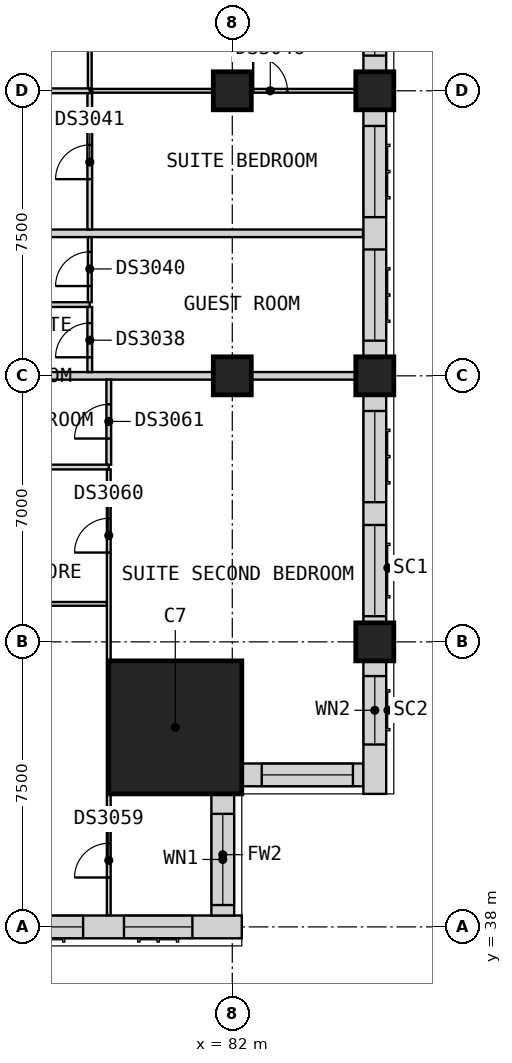
"""IFC4 building model, lengths in metres.
Left out: names, types, materials, properties, quantities, classifications, styles, units other than length and angle.
Written with IfcOpenShell. Run it as: python <this file> out.ifc"""

import sys

from ifc_helpers import new_model, si_unit, direction, frame, frame_2d, origin, origin_2d, place, context, subcontext, project, spatial, rectangle, extrude, element, fill, save


model = new_model("IFC4")
c1 = context("Model", 3, precision=1e-05, world=origin(), true_north=direction((0.0, 1.0)))
c2 = subcontext(c1, "Body", "Model", "MODEL_VIEW")
j1 = project(units=[si_unit("LENGTHUNIT", "METRE"), si_unit("PLANEANGLEUNIT", "RADIAN")], contexts=[c1])
p1 = place(None, origin())
s1 = spatial("IfcSite", under=j1, at=p1, CompositionType="ELEMENT")
p2 = place(p1, origin())
s2 = spatial("IfcBuilding", under=s1, at=p2, CompositionType="ELEMENT")
p3 = place(p2, frame((0.0, 0.0, 137.4)))
s3 = spatial("IfcBuildingStorey", under=s2, at=p3, CompositionType="ELEMENT", Elevation=137.4)
for number, where, z_axis, x_axis in (
    (1, (85.75, 45.5, 0.0), (0.0, 0.0, 1.0), (1.0, 0.0, 0.0)),
    (2, (85.75, 52.5, 0.0), (0.0, 0.0, 1.0), (1.0, 0.0, 0.0)),
    (3, (85.75, 60.0, 0.0), (0.0, 0.0, 1.0), (1.0, 0.0, 0.0)),
    (4, (82.0, 52.5, 0.0), (0.0, 0.0, 1.0), (1.0, 0.0, 0.0)),
    (5, (82.0, 60.0, 0.0), (0.0, 0.0, 1.0), (1.0, 0.0, 0.0)),
):
    element("IfcColumn", number, at=place(p3, frame(where, z_axis=z_axis, x_axis=x_axis)), inside=s3, PredefinedType="COLUMN", context=c2, shape_type="SweptSolid", body=[
        extrude(rectangle(XDim=1.0, YDim=1.0, at=origin_2d()), origin(), (0.0, 0.0, 1.0), 3.6),
    ])
p4 = place(p3, frame((80.5, 43.25, 0.0), z_axis=(0.0, 0.0, 1.0), x_axis=(1.0, 0.0, 0.0)))
e6 = element("IfcColumn", 6, at=p4, inside=s3, PredefinedType="COLUMN", context=c2, shape_type="SweptSolid", body=[
    extrude(rectangle(XDim=3.5, YDim=3.5, at=origin_2d()), origin(), (0.0, 0.0, 1.0), 3.6),
])
p5 = place(p3, frame((75.0, 38.0, 0.0), z_axis=(0.0, 0.0, 1.0), x_axis=(1.0, 0.0, 0.0)))
e7 = element("IfcWall", 7, at=p5, inside=s3, PredefinedType="SOLIDWALL", context=c2, shape_type="SweptSolid", body=[
    extrude(rectangle(XDim=7.25, YDim=0.6, at=frame_2d((3.625, 0.0))), origin(), (0.0, 0.0, 1.0), 2.85),
])
p6 = place(p5, frame((0.675, 0.0, 0.8)))
e8 = element("IfcOpeningElement", 8, at=p6, cuts=e7, PredefinedType="OPENING", context=c2, shape_type="SweptSolid", body=[
    extrude(rectangle(XDim=2.4, YDim=1.8, at=frame_2d((1.2, 0.9))), frame((0.0, 0.31, 0.0), z_axis=(0.0, -1.0, 0.0), x_axis=(1.0, 0.0, 0.0)), (0.0, 0.0, 1.0), 0.62),
])
p7 = place(p5, frame((4.15, 0.0, 0.8)))
e9 = element("IfcOpeningElement", 9, at=p7, cuts=e7, PredefinedType="OPENING", context=c2, shape_type="SweptSolid", body=[
    extrude(rectangle(XDim=1.8, YDim=1.8, at=frame_2d((0.9, 0.9))), frame((0.0, 0.31, 0.0), z_axis=(0.0, -1.0, 0.0), x_axis=(1.0, 0.0, 0.0)), (0.0, 0.0, 1.0), 0.62),
])
p8 = place(p3, frame((81.75, 38.3, 0.0), z_axis=(0.0, 0.0, 1.0), x_axis=(0.0, 1.0, 0.0)))
e10 = element("IfcWall", 10, at=p8, inside=s3, PredefinedType="SOLIDWALL", context=c2, shape_type="SweptSolid", body=[
    extrude(rectangle(XDim=3.2, YDim=0.6, at=frame_2d((1.6, 0.0))), origin(), (0.0, 0.0, 1.0), 3.35),
])
p9 = place(p8, frame((0.275, 0.0, 0.8)))
e11 = element("IfcOpeningElement", 11, at=p9, cuts=e10, PredefinedType="OPENING", context=c2, shape_type="SweptSolid", body=[
    extrude(rectangle(XDim=2.4, YDim=1.8, at=frame_2d((1.2, 0.9))), frame((0.0, 0.31, 0.0), z_axis=(0.0, -1.0, 0.0), x_axis=(1.0, 0.0, 0.0)), (0.0, 0.0, 1.0), 0.62),
])
p10 = place(p3, frame((82.25, 42.0, 0.0), z_axis=(0.0, 0.0, 1.0), x_axis=(1.0, 0.0, 0.0)))
e12 = element("IfcWall", 12, at=p10, inside=s3, PredefinedType="SOLIDWALL", context=c2, shape_type="SweptSolid", body=[
    extrude(rectangle(XDim=3.2, YDim=0.6, at=frame_2d((1.6, 0.0))), origin(), (0.0, 0.0, 1.0), 3.35),
])
p11 = place(p10, frame((0.525, 0.0, 0.8)))
e13 = element("IfcOpeningElement", 13, at=p11, cuts=e12, PredefinedType="OPENING", context=c2, shape_type="SweptSolid", body=[
    extrude(rectangle(XDim=2.4, YDim=1.8, at=frame_2d((1.2, 0.9))), frame((0.0, 0.31, 0.0), z_axis=(0.0, -1.0, 0.0), x_axis=(1.0, 0.0, 0.0)), (0.0, 0.0, 1.0), 0.62),
])
p12 = place(p3, frame((85.75, 41.5, 0.0), z_axis=(0.0, 0.0, 1.0), x_axis=(0.0, 1.0, 0.0)))
e14 = element("IfcWall", 14, at=p12, inside=s3, PredefinedType="SOLIDWALL", context=c2, shape_type="SweptSolid", body=[
    extrude(rectangle(XDim=3.5, YDim=0.6, at=frame_2d((1.75, 0.0))), origin(), (0.0, 0.0, 1.0), 3.35),
])
p13 = place(p12, frame((1.3, 0.0, 0.8)))
e15 = element("IfcOpeningElement", 15, at=p13, cuts=e14, PredefinedType="OPENING", context=c2, shape_type="SweptSolid", body=[
    extrude(rectangle(XDim=1.8, YDim=1.8, at=frame_2d((0.9, 0.9))), frame((0.0, 0.31, 0.0), z_axis=(0.0, -1.0, 0.0), x_axis=(1.0, 0.0, 0.0)), (0.0, 0.0, 1.0), 0.62),
])
p14 = place(p3, frame((85.75, 46.0, 0.0), z_axis=(0.0, 0.0, 1.0), x_axis=(0.0, 1.0, 0.0)))
e16 = element("IfcWall", 16, at=p14, inside=s3, PredefinedType="SOLIDWALL", context=c2, shape_type="SweptSolid", body=[
    extrude(rectangle(XDim=6.0, YDim=0.6, at=frame_2d((3.0, 0.0))), origin(), (0.0, 0.0, 1.0), 2.85),
])
p15 = place(p14, frame((0.175, 0.0, 0.8)))
e17 = element("IfcOpeningElement", 17, at=p15, cuts=e16, PredefinedType="OPENING", context=c2, shape_type="SweptSolid", body=[
    extrude(rectangle(XDim=2.4, YDim=1.8, at=frame_2d((1.2, 0.9))), frame((0.0, 0.31, 0.0), z_axis=(0.0, -1.0, 0.0), x_axis=(1.0, 0.0, 0.0)), (0.0, 0.0, 1.0), 0.62),
])
p16 = place(p14, frame((3.175, 0.0, 0.8)))
e18 = element("IfcOpeningElement", 18, at=p16, cuts=e16, PredefinedType="OPENING", context=c2, shape_type="SweptSolid", body=[
    extrude(rectangle(XDim=2.4, YDim=1.8, at=frame_2d((1.2, 0.9))), frame((0.0, 0.31, 0.0), z_axis=(0.0, -1.0, 0.0), x_axis=(1.0, 0.0, 0.0)), (0.0, 0.0, 1.0), 0.62),
])
p17 = place(p3, frame((85.75, 53.0, 0.0), z_axis=(0.0, 0.0, 1.0), x_axis=(0.0, 1.0, 0.0)))
e19 = element("IfcWall", 19, at=p17, inside=s3, PredefinedType="SOLIDWALL", context=c2, shape_type="SweptSolid", body=[
    extrude(rectangle(XDim=6.5, YDim=0.6, at=frame_2d((3.25, 0.0))), origin(), (0.0, 0.0, 1.0), 2.85),
])
p18 = place(p17, frame((0.425, 0.0, 0.8)))
e20 = element("IfcOpeningElement", 20, at=p18, cuts=e19, PredefinedType="OPENING", context=c2, shape_type="SweptSolid", body=[
    extrude(rectangle(XDim=2.4, YDim=1.8, at=frame_2d((1.2, 0.9))), frame((0.0, 0.31, 0.0), z_axis=(0.0, -1.0, 0.0), x_axis=(1.0, 0.0, 0.0)), (0.0, 0.0, 1.0), 0.62),
])
p19 = place(p17, frame((3.675, 0.0, 0.8)))
e21 = element("IfcOpeningElement", 21, at=p19, cuts=e19, PredefinedType="OPENING", context=c2, shape_type="SweptSolid", body=[
    extrude(rectangle(XDim=2.4, YDim=1.8, at=frame_2d((1.2, 0.9))), frame((0.0, 0.31, 0.0), z_axis=(0.0, -1.0, 0.0), x_axis=(1.0, 0.0, 0.0)), (0.0, 0.0, 1.0), 0.62),
])
p20 = place(p3, frame((85.75, 60.5, 0.0), z_axis=(0.0, 0.0, 1.0), x_axis=(0.0, 1.0, 0.0)))
e22 = element("IfcWall", 22, at=p20, inside=s3, PredefinedType="SOLIDWALL", context=c2, shape_type="SweptSolid", body=[
    extrude(rectangle(XDim=6.5, YDim=0.6, at=frame_2d((3.25, 0.0))), origin(), (0.0, 0.0, 1.0), 2.85),
])
p21 = place(p20, frame((0.425, 0.0, 0.8)))
e23 = element("IfcOpeningElement", 23, at=p21, cuts=e22, PredefinedType="OPENING", context=c2, shape_type="SweptSolid", body=[
    extrude(rectangle(XDim=2.4, YDim=1.8, at=frame_2d((1.2, 0.9))), frame((0.0, 0.31, 0.0), z_axis=(0.0, -1.0, 0.0), x_axis=(1.0, 0.0, 0.0)), (0.0, 0.0, 1.0), 0.62),
])
p22 = place(p20, frame((3.675, 0.0, 0.8)))
e24 = element("IfcOpeningElement", 24, at=p22, cuts=e22, PredefinedType="OPENING", context=c2, shape_type="SweptSolid", body=[
    extrude(rectangle(XDim=2.4, YDim=1.8, at=frame_2d((1.2, 0.9))), frame((0.0, 0.31, 0.0), z_axis=(0.0, -1.0, 0.0), x_axis=(1.0, 0.0, 0.0)), (0.0, 0.0, 1.0), 0.62),
])
p23 = place(p3, frame((73.725, 52.5, 0.0), z_axis=(0.0, 0.0, 1.0), x_axis=(1.0, 0.0, 0.0)))
e25 = element("IfcWall", 25, at=p23, inside=s3, PredefinedType="PARTITIONING", context=c2, shape_type="SweptSolid", body=[
    extrude(rectangle(XDim=12.525, YDim=0.2, at=frame_2d((6.262, 0.0))), origin(), (0.0, 0.0, 1.0), 3.35),
])
p24 = place(p3, frame((73.725, 56.25, 0.0), z_axis=(0.0, 0.0, 1.0), x_axis=(1.0, 0.0, 0.0)))
e26 = element("IfcWall", 26, at=p24, inside=s3, PredefinedType="PARTITIONING", context=c2, shape_type="SweptSolid", body=[
    extrude(rectangle(XDim=11.715, YDim=0.2, at=frame_2d((5.857, 0.0))), origin(), (0.0, 0.0, 1.0), 3.35),
])
p25 = place(p3, frame((78.8, 42.0, 0.0), z_axis=(0.0, 0.0, 1.0), x_axis=(1.0, 0.0, 0.0)))
e27 = element("IfcWall", 27, at=p25, inside=s3, PredefinedType="PARTITIONING", context=c2, shape_type="SweptSolid", body=[
    extrude(rectangle(XDim=3.44, YDim=0.1, at=frame_2d((1.72, 0.0))), origin(), (0.0, 0.0, 1.0), 3.35),
])
p26 = place(p3, frame((71.35, 46.5, 0.0), z_axis=(0.0, 0.0, 1.0), x_axis=(1.0, 0.0, 0.0)))
e28 = element("IfcWall", 28, at=p26, inside=s3, PredefinedType="PARTITIONING", context=c2, shape_type="SweptSolid", body=[
    extrude(rectangle(XDim=7.35, YDim=0.1, at=frame_2d((3.675, 0.0))), origin(), (0.0, 0.0, 1.0), 3.35),
])
p27 = place(p26, frame((0.65, 0.0, 0.0)))
e29 = element("IfcOpeningElement", 29, at=p27, cuts=e28, PredefinedType="OPENING", context=c2, shape_type="SweptSolid", body=[
    extrude(rectangle(XDim=0.9, YDim=2.1, at=frame_2d((0.45, 1.05))), frame((0.0, 0.06, 0.0), z_axis=(0.0, -1.0, 0.0), x_axis=(1.0, 0.0, 0.0)), (0.0, 0.0, 1.0), 0.12),
])
p28 = place(p3, frame((78.312, 60.0, 0.0), z_axis=(0.0, 0.0, 1.0), x_axis=(1.0, 0.0, 0.0)))
e30 = element("IfcWall", 30, at=p28, inside=s3, PredefinedType="PARTITIONING", context=c2, shape_type="SweptSolid", body=[
    extrude(rectangle(XDim=7.938, YDim=0.1, at=frame_2d((3.969, 0.0))), origin(), (0.0, 0.0, 1.0), 3.35),
])
p29 = place(p28, frame((4.238, 0.0, 0.0)))
e31 = element("IfcOpeningElement", 31, at=p29, cuts=e30, PredefinedType="OPENING", context=c2, shape_type="SweptSolid", body=[
    extrude(rectangle(XDim=0.9, YDim=2.1, at=frame_2d((0.45, 1.05))), frame((0.0, 0.06, 0.0), z_axis=(0.0, -1.0, 0.0), x_axis=(1.0, 0.0, 0.0)), (0.0, 0.0, 1.0), 0.12),
])
p30 = place(p3, frame((78.25, 54.438, 0.0), z_axis=(0.0, 0.0, 1.0), x_axis=(0.0, 1.0, 0.0)))
e32 = element("IfcWall", 32, at=p30, inside=s3, PredefinedType="PARTITIONING", context=c2, shape_type="SweptSolid", body=[
    extrude(rectangle(XDim=1.712, YDim=0.1, at=frame_2d((0.856, 0.0))), origin(), (0.0, 0.0, 1.0), 3.35),
])
p31 = place(p30, frame((0.425, 0.0, 0.0)))
e33 = element("IfcOpeningElement", 33, at=p31, cuts=e32, PredefinedType="OPENING", context=c2, shape_type="SweptSolid", body=[
    extrude(rectangle(XDim=0.9, YDim=2.1, at=frame_2d((0.45, 1.05))), frame((0.0, 0.06, 0.0), z_axis=(0.0, -1.0, 0.0), x_axis=(1.0, 0.0, 0.0)), (0.0, 0.0, 1.0), 0.12),
])
p32 = place(p3, frame((78.25, 60.062, 0.0), z_axis=(0.0, 0.0, 1.0), x_axis=(0.0, 1.0, 0.0)))
e34 = element("IfcWall", 34, at=p32, inside=s3, PredefinedType="PARTITIONING", context=c2, shape_type="SweptSolid", body=[
    extrude(rectangle(XDim=4.375, YDim=0.1, at=frame_2d((2.188, 0.0))), origin(), (0.0, 0.0, 1.0), 3.35),
])
p33 = place(p32, frame((1.738, 0.0, 0.0)))
e35 = element("IfcOpeningElement", 35, at=p33, cuts=e34, PredefinedType="OPENING", context=c2, shape_type="SweptSolid", body=[
    extrude(rectangle(XDim=0.9, YDim=2.1, at=frame_2d((0.45, 1.05))), frame((0.0, 0.06, 0.0), z_axis=(0.0, -1.0, 0.0), x_axis=(1.0, 0.0, 0.0)), (0.0, 0.0, 1.0), 0.12),
])
p34 = place(p3, frame((78.75, 38.31, 0.0), z_axis=(0.0, 0.0, 1.0), x_axis=(0.0, 1.0, 0.0)))
e36 = element("IfcWall", 36, at=p34, inside=s3, PredefinedType="PARTITIONING", context=c2, shape_type="SweptSolid", body=[
    extrude(rectangle(XDim=11.728, YDim=0.1, at=frame_2d((5.864, 0.0))), origin(), (0.0, 0.0, 1.0), 3.35),
])
p35 = place(p34, frame((0.99, 0.0, 0.0)))
e37 = element("IfcOpeningElement", 37, at=p35, cuts=e36, PredefinedType="OPENING", context=c2, shape_type="SweptSolid", body=[
    extrude(rectangle(XDim=0.9, YDim=2.1, at=frame_2d((0.45, 1.05))), frame((0.0, 0.06, 0.0), z_axis=(0.0, -1.0, 0.0), x_axis=(1.0, 0.0, 0.0)), (0.0, 0.0, 1.0), 0.12),
])
p36 = place(p34, frame((9.54, 0.0, 0.0)))
e38 = element("IfcOpeningElement", 38, at=p36, cuts=e36, PredefinedType="OPENING", context=c2, shape_type="SweptSolid", body=[
    extrude(rectangle(XDim=0.9, YDim=2.1, at=frame_2d((0.45, 1.05))), frame((0.0, 0.06, 0.0), z_axis=(0.0, -1.0, 0.0), x_axis=(1.0, 0.0, 0.0)), (0.0, 0.0, 1.0), 0.12),
])
p37 = place(p3, frame((73.725, 50.1, 0.0), z_axis=(0.0, 0.0, 1.0), x_axis=(1.0, 0.0, 0.0)))
e39 = element("IfcWall", 39, at=p37, inside=s3, PredefinedType="PARTITIONING", context=c2, shape_type="SweptSolid", body=[
    extrude(rectangle(XDim=5.025, YDim=0.125, at=frame_2d((2.512, 0.0))), origin(), (0.0, 0.0, 1.0), 3.35),
])
for number, where, z_axis, x_axis in (
    (40, (73.725, 54.375, 0.0), (0.0, 0.0, 1.0), (1.0, 0.0, 0.0)),
    (41, (73.725, 60.0, 0.0), (0.0, 0.0, 1.0), (1.0, 0.0, 0.0)),
):
    element("IfcWall", number, at=place(p3, frame(where, z_axis=z_axis, x_axis=x_axis)), inside=s3, PredefinedType="PARTITIONING", context=c2, shape_type="SweptSolid", body=[
        extrude(rectangle(XDim=4.525, YDim=0.125, at=frame_2d((2.262, 0.0))), origin(), (0.0, 0.0, 1.0), 3.35),
    ])
p38 = place(p3, frame((78.25, 52.6, 0.0), z_axis=(0.0, 0.0, 1.0), x_axis=(0.0, 1.0, 0.0)))
e42 = element("IfcWall", 42, at=p38, inside=s3, PredefinedType="PARTITIONING", context=c2, shape_type="SweptSolid", body=[
    extrude(rectangle(XDim=1.712, YDim=0.125, at=frame_2d((0.856, 0.0))), origin(), (0.0, 0.0, 1.0), 3.35),
])
p39 = place(p38, frame((0.387, 0.0, 0.0)))
e43 = element("IfcOpeningElement", 43, at=p39, cuts=e42, PredefinedType="OPENING", context=c2, shape_type="SweptSolid", body=[
    extrude(rectangle(XDim=0.9, YDim=2.1, at=frame_2d((0.45, 1.05))), frame((0.0, 0.073, 0.0), z_axis=(0.0, -1.0, 0.0), x_axis=(1.0, 0.0, 0.0)), (0.0, 0.0, 1.0), 0.145),
])
p40 = place(p3, frame((78.25, 56.35, 0.0), z_axis=(0.0, 0.0, 1.0), x_axis=(0.0, 1.0, 0.0)))
e44 = element("IfcWall", 44, at=p40, inside=s3, PredefinedType="PARTITIONING", context=c2, shape_type="SweptSolid", body=[
    extrude(rectangle(XDim=3.587, YDim=0.125, at=frame_2d((1.794, 0.0))), origin(), (0.0, 0.0, 1.0), 3.35),
])
p41 = place(p40, frame((1.325, 0.0, 0.0)))
e45 = element("IfcOpeningElement", 45, at=p41, cuts=e44, PredefinedType="OPENING", context=c2, shape_type="SweptSolid", body=[
    extrude(rectangle(XDim=0.9, YDim=2.1, at=frame_2d((0.45, 1.05))), frame((0.0, 0.073, 0.0), z_axis=(0.0, -1.0, 0.0), x_axis=(1.0, 0.0, 0.0)), (0.0, 0.0, 1.0), 0.145),
])
p42 = place(p3, frame((78.75, 50.163, 0.0), z_axis=(0.0, 0.0, 1.0), x_axis=(0.0, 1.0, 0.0)))
e46 = element("IfcWall", 46, at=p42, inside=s3, PredefinedType="PARTITIONING", context=c2, shape_type="SweptSolid", body=[
    extrude(rectangle(XDim=2.237, YDim=0.125, at=frame_2d((1.119, 0.0))), origin(), (0.0, 0.0, 1.0), 3.35),
])
p43 = place(p42, frame((0.688, 0.0, 0.0)))
e47 = element("IfcOpeningElement", 47, at=p43, cuts=e46, PredefinedType="OPENING", context=c2, shape_type="SweptSolid", body=[
    extrude(rectangle(XDim=0.9, YDim=2.1, at=frame_2d((0.45, 1.05))), frame((0.0, 0.073, 0.0), z_axis=(0.0, -1.0, 0.0), x_axis=(1.0, 0.0, 0.0)), (0.0, 0.0, 1.0), 0.145),
])
p44 = place(p6, origin())
e48 = element("IfcWindow", 48, at=p44, inside=s3, PartitioningType="SINGLE_PANEL", PredefinedType="WINDOW", context=c2, shape_type="SweptSolid", body=[
    extrude(rectangle(XDim=2.4, YDim=1.8, at=frame_2d((1.2, 0.9))), frame((0.0, -0.07, 0.0), z_axis=(0.0, -1.0, 0.0), x_axis=(1.0, 0.0, 0.0)), (0.0, 0.0, 1.0), 0.06),
])
fill(e8, e48)
p45 = place(p7, origin())
e49 = element("IfcWindow", 49, at=p45, inside=s3, PartitioningType="SINGLE_PANEL", PredefinedType="WINDOW", context=c2, shape_type="SweptSolid", body=[
    extrude(rectangle(XDim=1.8, YDim=1.8, at=frame_2d((0.9, 0.9))), frame((0.0, -0.07, 0.0), z_axis=(0.0, -1.0, 0.0), x_axis=(1.0, 0.0, 0.0)), (0.0, 0.0, 1.0), 0.06),
])
fill(e9, e49)
p46 = place(p9, origin())
e50 = element("IfcWindow", 50, at=p46, inside=s3, PartitioningType="SINGLE_PANEL", PredefinedType="WINDOW", context=c2, shape_type="SweptSolid", body=[
    extrude(rectangle(XDim=2.4, YDim=1.8, at=frame_2d((1.2, 0.9))), frame((0.0, -0.07, 0.0), z_axis=(0.0, -1.0, 0.0), x_axis=(1.0, 0.0, 0.0)), (0.0, 0.0, 1.0), 0.06),
])
fill(e11, e50)
p47 = place(p11, origin())
e51 = element("IfcWindow", 51, at=p47, inside=s3, PartitioningType="SINGLE_PANEL", PredefinedType="WINDOW", context=c2, shape_type="SweptSolid", body=[
    extrude(rectangle(XDim=2.4, YDim=1.8, at=frame_2d((1.2, 0.9))), frame((0.0, -0.07, 0.0), z_axis=(0.0, -1.0, 0.0), x_axis=(1.0, 0.0, 0.0)), (0.0, 0.0, 1.0), 0.06),
])
fill(e13, e51)
p48 = place(p13, origin())
e52 = element("IfcWindow", 52, at=p48, inside=s3, PartitioningType="SINGLE_PANEL", PredefinedType="WINDOW", context=c2, shape_type="SweptSolid", body=[
    extrude(rectangle(XDim=1.8, YDim=1.8, at=frame_2d((0.9, 0.9))), frame((0.0, -0.07, 0.0), z_axis=(0.0, -1.0, 0.0), x_axis=(1.0, 0.0, 0.0)), (0.0, 0.0, 1.0), 0.06),
])
fill(e15, e52)
p49 = place(p15, origin())
e53 = element("IfcWindow", 53, at=p49, inside=s3, PartitioningType="SINGLE_PANEL", PredefinedType="WINDOW", context=c2, shape_type="SweptSolid", body=[
    extrude(rectangle(XDim=2.4, YDim=1.8, at=frame_2d((1.2, 0.9))), frame((0.0, -0.07, 0.0), z_axis=(0.0, -1.0, 0.0), x_axis=(1.0, 0.0, 0.0)), (0.0, 0.0, 1.0), 0.06),
])
fill(e17, e53)
p50 = place(p16, origin())
e54 = element("IfcWindow", 54, at=p50, inside=s3, PartitioningType="SINGLE_PANEL", PredefinedType="WINDOW", context=c2, shape_type="SweptSolid", body=[
    extrude(rectangle(XDim=2.4, YDim=1.8, at=frame_2d((1.2, 0.9))), frame((0.0, -0.07, 0.0), z_axis=(0.0, -1.0, 0.0), x_axis=(1.0, 0.0, 0.0)), (0.0, 0.0, 1.0), 0.06),
])
fill(e18, e54)
p51 = place(p18, origin())
e55 = element("IfcWindow", 55, at=p51, inside=s3, PartitioningType="SINGLE_PANEL", PredefinedType="WINDOW", context=c2, shape_type="SweptSolid", body=[
    extrude(rectangle(XDim=2.4, YDim=1.8, at=frame_2d((1.2, 0.9))), frame((0.0, -0.07, 0.0), z_axis=(0.0, -1.0, 0.0), x_axis=(1.0, 0.0, 0.0)), (0.0, 0.0, 1.0), 0.06),
])
fill(e20, e55)
p52 = place(p19, origin())
e56 = element("IfcWindow", 56, at=p52, inside=s3, PartitioningType="SINGLE_PANEL", PredefinedType="WINDOW", context=c2, shape_type="SweptSolid", body=[
    extrude(rectangle(XDim=2.4, YDim=1.8, at=frame_2d((1.2, 0.9))), frame((0.0, -0.07, 0.0), z_axis=(0.0, -1.0, 0.0), x_axis=(1.0, 0.0, 0.0)), (0.0, 0.0, 1.0), 0.06),
])
fill(e21, e56)
p53 = place(p21, origin())
e57 = element("IfcWindow", 57, at=p53, inside=s3, PartitioningType="SINGLE_PANEL", PredefinedType="WINDOW", context=c2, shape_type="SweptSolid", body=[
    extrude(rectangle(XDim=2.4, YDim=1.8, at=frame_2d((1.2, 0.9))), frame((0.0, -0.07, 0.0), z_axis=(0.0, -1.0, 0.0), x_axis=(1.0, 0.0, 0.0)), (0.0, 0.0, 1.0), 0.06),
])
fill(e23, e57)
p54 = place(p39, origin())
e58 = element("IfcDoor", 58, at=p54, inside=s3, OperationType="SINGLE_SWING_LEFT", PredefinedType="DOOR", context=c2, shape_type="SweptSolid", body=[
    extrude(rectangle(XDim=0.9, YDim=2.1, at=frame_2d((0.45, 1.05))), frame((0.0, 0.025, 0.0), z_axis=(0.0, -1.0, 0.0), x_axis=(1.0, 0.0, 0.0)), (0.0, 0.0, 1.0), 0.05),
])
fill(e43, e58)
p55 = place(p31, origin())
e59 = element("IfcDoor", 59, at=p55, inside=s3, OperationType="SINGLE_SWING_LEFT", PredefinedType="DOOR", context=c2, shape_type="SweptSolid", body=[
    extrude(rectangle(XDim=0.9, YDim=2.1, at=frame_2d((0.45, 1.05))), frame((0.0, 0.025, 0.0), z_axis=(0.0, -1.0, 0.0), x_axis=(1.0, 0.0, 0.0)), (0.0, 0.0, 1.0), 0.05),
])
fill(e33, e59)
p56 = place(p41, origin())
e60 = element("IfcDoor", 60, at=p56, inside=s3, OperationType="SINGLE_SWING_LEFT", PredefinedType="DOOR", context=c2, shape_type="SweptSolid", body=[
    extrude(rectangle(XDim=0.9, YDim=2.1, at=frame_2d((0.45, 1.05))), frame((0.0, 0.025, 0.0), z_axis=(0.0, -1.0, 0.0), x_axis=(1.0, 0.0, 0.0)), (0.0, 0.0, 1.0), 0.05),
])
fill(e45, e60)
p57 = place(p29, origin())
e61 = element("IfcDoor", 61, at=p57, inside=s3, OperationType="SINGLE_SWING_LEFT", PredefinedType="DOOR", context=c2, shape_type="SweptSolid", body=[
    extrude(rectangle(XDim=0.9, YDim=2.1, at=frame_2d((0.45, 1.05))), frame((0.0, 0.025, 0.0), z_axis=(0.0, -1.0, 0.0), x_axis=(1.0, 0.0, 0.0)), (0.0, 0.0, 1.0), 0.05),
])
fill(e31, e61)
p58 = place(p35, origin())
e62 = element("IfcDoor", 62, at=p58, inside=s3, OperationType="SINGLE_SWING_LEFT", PredefinedType="DOOR", context=c2, shape_type="SweptSolid", body=[
    extrude(rectangle(XDim=0.9, YDim=2.1, at=frame_2d((0.45, 1.05))), frame((0.0, 0.025, 0.0), z_axis=(0.0, -1.0, 0.0), x_axis=(1.0, 0.0, 0.0)), (0.0, 0.0, 1.0), 0.05),
])
fill(e37, e62)
p59 = place(p36, origin())
e63 = element("IfcDoor", 63, at=p59, inside=s3, OperationType="SINGLE_SWING_RIGHT", PredefinedType="DOOR", context=c2, shape_type="SweptSolid", body=[
    extrude(rectangle(XDim=0.9, YDim=2.1, at=frame_2d((0.45, 1.05))), frame((0.0, 0.025, 0.0), z_axis=(0.0, -1.0, 0.0), x_axis=(1.0, 0.0, 0.0)), (0.0, 0.0, 1.0), 0.05),
])
fill(e38, e63)
p60 = place(p43, origin())
e64 = element("IfcDoor", 64, at=p60, inside=s3, OperationType="SINGLE_SWING_LEFT", PredefinedType="DOOR", context=c2, shape_type="SweptSolid", body=[
    extrude(rectangle(XDim=0.9, YDim=2.1, at=frame_2d((0.45, 1.05))), frame((0.0, 0.025, 0.0), z_axis=(0.0, -1.0, 0.0), x_axis=(1.0, 0.0, 0.0)), (0.0, 0.0, 1.0), 0.05),
])
fill(e47, e64)
save(model, sys.argv[1])
